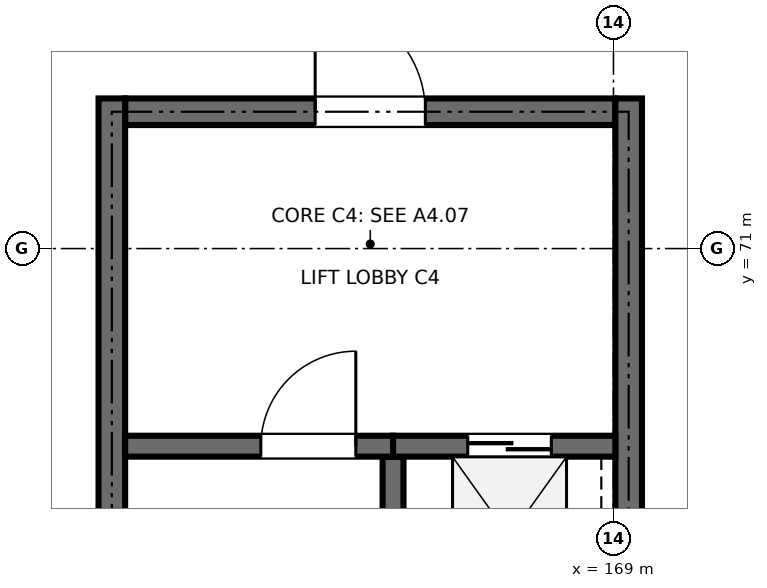
"""IFC4 building model, lengths in metres.
Left out: names, types, materials, properties, quantities, classifications, styles, units other than length and angle.
Written with IfcOpenShell. Run it as: python <this file> out.ifc"""

import sys

from ifc_helpers import new_model, si_unit, direction, frame, frame_2d, origin, place, context, subcontext, project, spatial, rectangle, extrude, element, fill, save


model = new_model("IFC4")
c1 = context("Model", 3, precision=1e-05, world=origin(), true_north=direction((0.0, 1.0)))
c2 = subcontext(c1, "Body", "Model", "MODEL_VIEW")
j1 = project(units=[si_unit("LENGTHUNIT", "METRE"), si_unit("PLANEANGLEUNIT", "RADIAN")], contexts=[c1])
p1 = place(None, origin())
s1 = spatial("IfcSite", under=j1, at=p1, CompositionType="ELEMENT")
p2 = place(p1, origin())
s2 = spatial("IfcBuilding", under=s1, at=p2, CompositionType="ELEMENT")
p3 = place(p2, origin())
s3 = spatial("IfcBuildingStorey", under=s2, at=p3, CompositionType="ELEMENT", Elevation=0.0)
p4 = place(p3, frame((162.575, 72.8, 0.0), z_axis=(0.0, 0.0, 1.0), x_axis=(1.0, 0.0, 0.0)))
e1 = element("IfcWall", 1, at=p4, inside=s3, PredefinedType="SHEAR", context=c2, shape_type="SweptSolid", body=[
    extrude(rectangle(XDim=6.45, YDim=0.35, at=frame_2d((3.225, 0.0))), origin(), (0.0, 0.0, 1.0), 4.52),
])
p5 = place(p4, frame((2.5, 0.0, 0.0)))
e2 = element("IfcOpeningElement", 2, at=p5, cuts=e1, PredefinedType="OPENING", context=c2, shape_type="SweptSolid", body=[
    extrude(rectangle(XDim=1.45, YDim=2.2, at=frame_2d((0.725, 1.1))), frame((0.0, 0.185, 0.0), z_axis=(0.0, -1.0, 0.0), x_axis=(1.0, 0.0, 0.0)), (0.0, 0.0, 1.0), 0.37),
])
for number, where, z_axis, x_axis in (
    (3, (162.4, 61.375, 0.0), (0.0, 0.0, 1.0), (0.0, 1.0, 0.0)),
    (4, (169.2, 61.375, 0.0), (0.0, 0.0, 1.0), (0.0, 1.0, 0.0)),
):
    element("IfcWall", number, at=place(p3, frame(where, z_axis=z_axis, x_axis=x_axis)), inside=s3, PredefinedType="SHEAR", context=c2, shape_type="SweptSolid", body=[
        extrude(rectangle(XDim=11.6, YDim=0.35, at=frame_2d((5.8, 0.0))), origin(), (0.0, 0.0, 1.0), 4.52),
    ])
p6 = place(p3, frame((166.1, 61.375, 0.0), z_axis=(0.0, 0.0, 1.0), x_axis=(0.0, 1.0, 0.0)))
e5 = element("IfcWall", 5, at=p6, inside=s3, PredefinedType="SHEAR", context=c2, shape_type="SweptSolid", body=[
    extrude(rectangle(XDim=6.887, YDim=0.275, at=frame_2d((3.444, 0.0))), origin(), (0.0, 0.0, 1.0), 4.52),
])
p7 = place(p3, frame((162.575, 68.4, 0.0), z_axis=(0.0, 0.0, 1.0), x_axis=(1.0, 0.0, 0.0)))
e6 = element("IfcWall", 6, at=p7, inside=s3, PredefinedType="SHEAR", context=c2, shape_type="SweptSolid", body=[
    extrude(rectangle(XDim=3.525, YDim=0.275, at=frame_2d((1.763, 0.0))), origin(), (0.0, 0.0, 1.0), 4.52),
])
p8 = place(p7, frame((1.785, 0.0, 0.0)))
e7 = element("IfcOpeningElement", 7, at=p8, cuts=e6, PredefinedType="OPENING", context=c2, shape_type="SweptSolid", body=[
    extrude(rectangle(XDim=1.25, YDim=2.15, at=frame_2d((0.625, 1.075))), frame((0.0, 0.147, 0.0), z_axis=(0.0, -1.0, 0.0), x_axis=(1.0, 0.0, 0.0)), (0.0, 0.0, 1.0), 0.295),
])
p9 = place(p3, frame((166.1, 68.4, 0.0), z_axis=(0.0, 0.0, 1.0), x_axis=(1.0, 0.0, 0.0)))
e8 = element("IfcWall", 8, at=p9, inside=s3, PredefinedType="SHEAR", context=c2, shape_type="SweptSolid", body=[
    extrude(rectangle(XDim=2.925, YDim=0.275, at=frame_2d((1.462, 0.0))), origin(), (0.0, 0.0, 1.0), 4.52),
])
p10 = place(p9, frame((0.982, 0.0, 0.0)))
e9 = element("IfcOpeningElement", 9, at=p10, cuts=e8, PredefinedType="OPENING", context=c2, shape_type="SweptSolid", body=[
    extrude(rectangle(XDim=1.1, YDim=2.15, at=frame_2d((0.55, 1.075))), frame((0.0, 0.147, 0.0), z_axis=(0.0, -1.0, 0.0), x_axis=(1.0, 0.0, 0.0)), (0.0, 0.0, 1.0), 0.295),
])
p11 = place(p8, origin())
e10 = element("IfcDoor", 10, at=p11, inside=s3, OperationType="SINGLE_SWING_RIGHT", PredefinedType="DOOR", context=c2, shape_type="SweptSolid", body=[
    extrude(rectangle(XDim=1.25, YDim=2.15, at=frame_2d((0.625, 1.075))), frame((0.0, 0.025, 0.0), z_axis=(0.0, -1.0, 0.0), x_axis=(1.0, 0.0, 0.0)), (0.0, 0.0, 1.0), 0.05),
])
fill(e7, e10)
p12 = place(p10, origin())
e11 = element("IfcDoor", 11, at=p12, inside=s3, OperationType="DOUBLE_DOOR_SLIDING", PredefinedType="DOOR", context=c2, shape_type="SweptSolid", body=[
    extrude(rectangle(XDim=1.1, YDim=2.15, at=frame_2d((0.55, 1.075))), frame((0.0, 0.025, 0.0), z_axis=(0.0, -1.0, 0.0), x_axis=(1.0, 0.0, 0.0)), (0.0, 0.0, 1.0), 0.05),
])
fill(e9, e11)
p13 = place(p5, origin())
e12 = element("IfcDoor", 12, at=p13, inside=s3, OperationType="SINGLE_SWING_LEFT", PredefinedType="DOOR", context=c2, shape_type="SweptSolid", body=[
    extrude(rectangle(XDim=1.45, YDim=2.2, at=frame_2d((0.725, 1.1))), frame((0.0, 0.025, 0.0), z_axis=(0.0, -1.0, 0.0), x_axis=(1.0, 0.0, 0.0)), (0.0, 0.0, 1.0), 0.05),
])
fill(e2, e12)
save(model, sys.argv[1])
